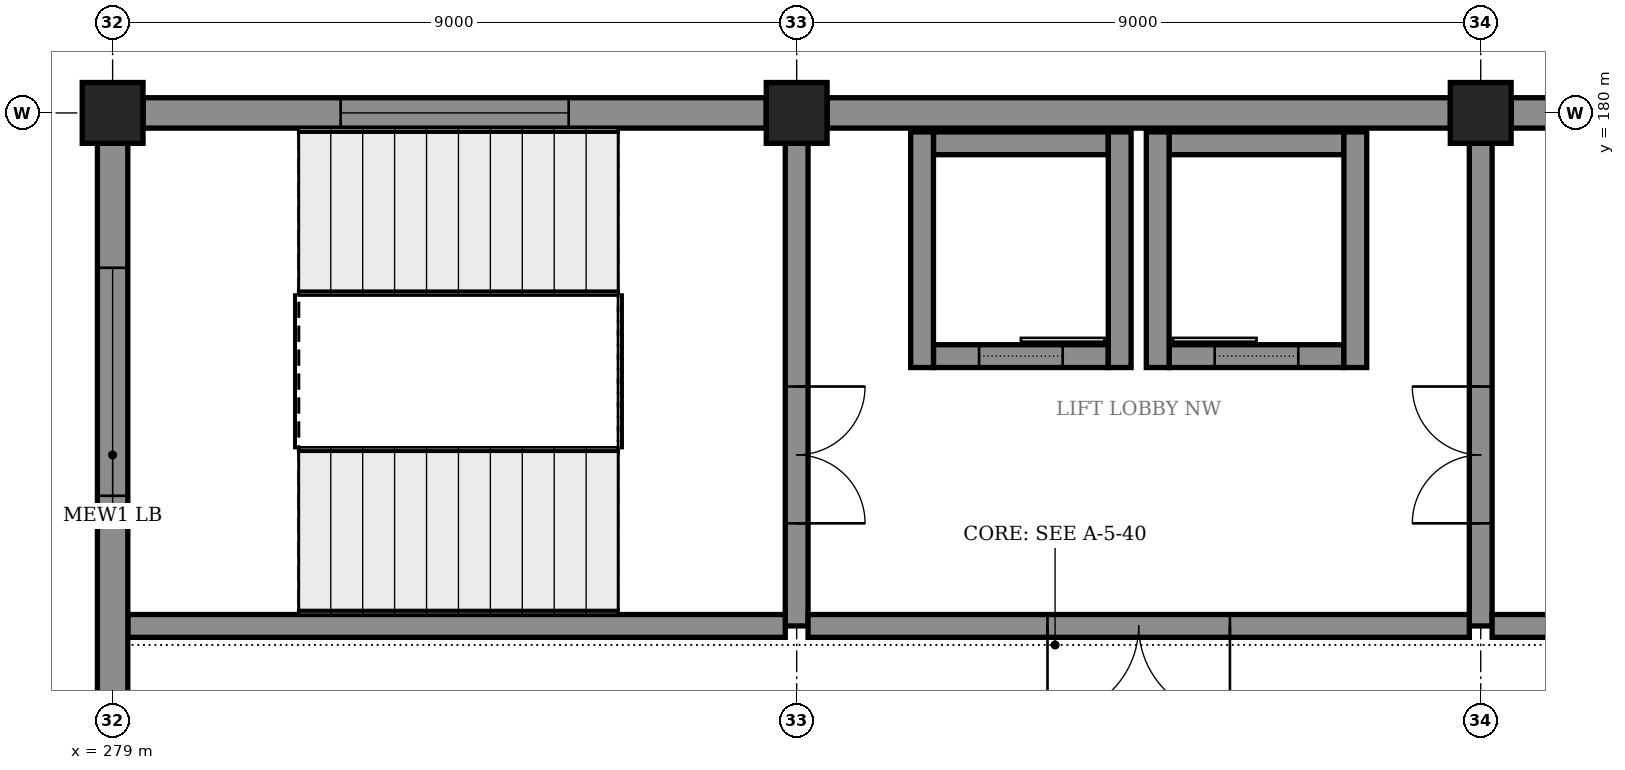
"""IFC4 building model, lengths in metres.
Left out: names, types, materials, properties, quantities, classifications, styles, units other than length and angle.
Written with IfcOpenShell. Run it as: python <this file> out.ifc"""

import sys

from ifc_helpers import new_model, si_unit, direction, frame, frame_2d, origin, origin_2d, place, context, subcontext, project, spatial, rectangle, extrude, element, fill, save


model = new_model("IFC4")
c1 = context("Model", 3, precision=1e-05, world=origin(), true_north=direction((0.0, 1.0)))
c2 = subcontext(c1, "Body", "Model", "MODEL_VIEW")
j1 = project(units=[si_unit("LENGTHUNIT", "METRE"), si_unit("PLANEANGLEUNIT", "RADIAN")], contexts=[c1])
p1 = place(None, origin())
s1 = spatial("IfcSite", under=j1, at=p1, CompositionType="ELEMENT")
p2 = place(p1, origin())
s2 = spatial("IfcBuilding", under=s1, at=p2, CompositionType="ELEMENT")
p3 = place(p2, frame((0.0, 0.0, 6.0)))
s3 = spatial("IfcBuildingStorey", under=s2, at=p3, CompositionType="ELEMENT", Elevation=6.0)
for number, where, z_axis, x_axis in (
    (1, (279.0, 180.0, 0.0), (0.0, 0.0, 1.0), (1.0, 0.0, 0.0)),
    (2, (288.0, 180.0, 0.0), (0.0, 0.0, 1.0), (1.0, 0.0, 0.0)),
    (3, (297.0, 180.0, 0.0), (0.0, 0.0, 1.0), (1.0, 0.0, 0.0)),
):
    element("IfcColumn", number, at=place(p3, frame(where, z_axis=z_axis, x_axis=x_axis)), inside=s3, PredefinedType="COLUMN", context=c2, shape_type="SweptSolid", body=[
        extrude(rectangle(XDim=0.8, YDim=0.8, at=origin_2d()), origin(), (0.0, 0.0, 1.0), 5.5),
    ])
p4 = place(p3, frame((279.4, 180.0, 0.0), z_axis=(0.0, 0.0, 1.0), x_axis=(1.0, 0.0, 0.0)))
e4 = element("IfcWall", 4, at=p4, inside=s3, PredefinedType="STANDARD", context=c2, shape_type="SweptSolid", body=[
    extrude(rectangle(XDim=8.2, YDim=0.4, at=frame_2d((4.1, 0.0))), origin(), (0.0, 0.0, 1.0), 4.32),
])
p5 = place(p4, frame((2.6, 0.0, 0.9)))
e5 = element("IfcOpeningElement", 5, at=p5, cuts=e4, PredefinedType="OPENING", context=c2, shape_type="SweptSolid", body=[
    extrude(rectangle(XDim=3.0, YDim=2.1, at=frame_2d((1.5, 1.05))), frame((0.0, 0.21, 0.0), z_axis=(0.0, -1.0, 0.0), x_axis=(1.0, 0.0, 0.0)), (0.0, 0.0, 1.0), 0.42),
])
p6 = place(p3, frame((288.4, 180.0, 0.0), z_axis=(0.0, 0.0, 1.0), x_axis=(1.0, 0.0, 0.0)))
e6 = element("IfcWall", 6, at=p6, inside=s3, PredefinedType="STANDARD", context=c2, shape_type="SweptSolid", body=[
    extrude(rectangle(XDim=8.2, YDim=0.4, at=frame_2d((4.1, 0.0))), origin(), (0.0, 0.0, 1.0), 4.32),
])
p7 = place(p3, frame((297.4, 180.0, 0.0), z_axis=(0.0, 0.0, 1.0), x_axis=(1.0, 0.0, 0.0)))
e7 = element("IfcWall", 7, at=p7, inside=s3, PredefinedType="STANDARD", context=c2, shape_type="SweptSolid", body=[
    extrude(rectangle(XDim=8.2, YDim=0.4, at=frame_2d((4.1, 0.0))), origin(), (0.0, 0.0, 1.0), 4.32),
])
p8 = place(p7, frame((2.6, 0.0, 0.9)))
e8 = element("IfcOpeningElement", 8, at=p8, cuts=e7, PredefinedType="OPENING", context=c2, shape_type="SweptSolid", body=[
    extrude(rectangle(XDim=3.0, YDim=2.1, at=frame_2d((1.5, 1.05))), frame((0.0, 0.21, 0.0), z_axis=(0.0, -1.0, 0.0), x_axis=(1.0, 0.0, 0.0)), (0.0, 0.0, 1.0), 0.42),
])
p9 = place(p3, frame((279.0, 171.4, 0.0), z_axis=(0.0, 0.0, 1.0), x_axis=(0.0, 1.0, 0.0)))
e9 = element("IfcWall", 9, at=p9, inside=s3, PredefinedType="STANDARD", context=c2, shape_type="SweptSolid", body=[
    extrude(rectangle(XDim=8.2, YDim=0.4, at=frame_2d((4.1, 0.0))), origin(), (0.0, 0.0, 1.0), 4.32),
])
p10 = place(p9, frame((3.562, 0.0, 0.9)))
e10 = element("IfcOpeningElement", 10, at=p10, cuts=e9, PredefinedType="OPENING", context=c2, shape_type="SweptSolid", body=[
    extrude(rectangle(XDim=3.0, YDim=2.1, at=frame_2d((1.5, 1.05))), frame((0.0, 0.21, 0.0), z_axis=(0.0, -1.0, 0.0), x_axis=(1.0, 0.0, 0.0)), (0.0, 0.0, 1.0), 0.42),
])
p11 = place(p3, frame((288.0, 173.25, 0.0), z_axis=(0.0, 0.0, 1.0), x_axis=(0.0, 1.0, 0.0)))
e11 = element("IfcWall", 11, at=p11, inside=s3, PredefinedType="SHEAR", context=c2, shape_type="SweptSolid", body=[
    extrude(rectangle(XDim=6.35, YDim=0.3, at=frame_2d((3.175, 0.0))), origin(), (0.0, 0.0, 1.0), 5.22),
])
p12 = place(p11, frame((1.35, 0.0, 0.0)))
e12 = element("IfcOpeningElement", 12, at=p12, cuts=e11, PredefinedType="OPENING", context=c2, shape_type="SweptSolid", body=[
    extrude(rectangle(XDim=1.8, YDim=2.4, at=frame_2d((0.9, 1.2))), frame((0.0, 0.16, 0.0), z_axis=(0.0, -1.0, 0.0), x_axis=(1.0, 0.0, 0.0)), (0.0, 0.0, 1.0), 0.32),
])
p13 = place(p3, frame((297.0, 173.25, 0.0), z_axis=(0.0, 0.0, 1.0), x_axis=(0.0, 1.0, 0.0)))
e13 = element("IfcWall", 13, at=p13, inside=s3, PredefinedType="SHEAR", context=c2, shape_type="SweptSolid", body=[
    extrude(rectangle(XDim=6.35, YDim=0.3, at=frame_2d((3.175, 0.0))), origin(), (0.0, 0.0, 1.0), 5.22),
])
p14 = place(p13, frame((1.35, 0.0, 0.0)))
e14 = element("IfcOpeningElement", 14, at=p14, cuts=e13, PredefinedType="OPENING", context=c2, shape_type="SweptSolid", body=[
    extrude(rectangle(XDim=1.8, YDim=2.4, at=frame_2d((0.9, 1.2))), frame((0.0, 0.16, 0.0), z_axis=(0.0, -1.0, 0.0), x_axis=(1.0, 0.0, 0.0)), (0.0, 0.0, 1.0), 0.32),
])
p15 = place(p3, frame((279.2, 173.25, 0.0), z_axis=(0.0, 0.0, 1.0), x_axis=(1.0, 0.0, 0.0)))
e15 = element("IfcWall", 15, at=p15, inside=s3, PredefinedType="SHEAR", context=c2, shape_type="SweptSolid", body=[
    extrude(rectangle(XDim=8.65, YDim=0.3, at=frame_2d((4.325, 0.0))), origin(), (0.0, 0.0, 1.0), 5.22),
])
p16 = place(p3, frame((288.15, 173.25, 0.0), z_axis=(0.0, 0.0, 1.0), x_axis=(1.0, 0.0, 0.0)))
e16 = element("IfcWall", 16, at=p16, inside=s3, PredefinedType="SHEAR", context=c2, shape_type="SweptSolid", body=[
    extrude(rectangle(XDim=8.7, YDim=0.3, at=frame_2d((4.35, 0.0))), origin(), (0.0, 0.0, 1.0), 5.22),
])
p17 = place(p16, frame((3.15, 0.0, 0.0)))
e17 = element("IfcOpeningElement", 17, at=p17, cuts=e16, PredefinedType="OPENING", context=c2, shape_type="SweptSolid", body=[
    extrude(rectangle(XDim=2.4, YDim=2.4, at=frame_2d((1.2, 1.2))), frame((0.0, 0.16, 0.0), z_axis=(0.0, -1.0, 0.0), x_axis=(1.0, 0.0, 0.0)), (0.0, 0.0, 1.0), 0.32),
])
p18 = place(p3, frame((297.15, 173.25, 0.0), z_axis=(0.0, 0.0, 1.0), x_axis=(1.0, 0.0, 0.0)))
e18 = element("IfcWall", 18, at=p18, inside=s3, PredefinedType="SHEAR", context=c2, shape_type="SweptSolid", body=[
    extrude(rectangle(XDim=8.7, YDim=0.3, at=frame_2d((4.35, 0.0))), origin(), (0.0, 0.0, 1.0), 5.22),
])
for number, where, z_axis, x_axis in (
    (19, (289.65, 176.65, 0.0), (0.0, 0.0, 1.0), (0.0, 1.0, 0.0)),
    (20, (292.25, 176.65, 0.0), (0.0, 0.0, 1.0), (0.0, 1.0, 0.0)),
):
    element("IfcWall", number, at=place(p3, frame(where, z_axis=z_axis, x_axis=x_axis)), inside=s3, PredefinedType="SHEAR", context=c2, shape_type="SweptSolid", body=[
        extrude(rectangle(XDim=3.1, YDim=0.3, at=frame_2d((1.55, 0.0))), origin(), (0.0, 0.0, 1.0), 5.5),
    ])
p19 = place(p3, frame((289.8, 179.6, 0.0), z_axis=(0.0, 0.0, 1.0), x_axis=(1.0, 0.0, 0.0)))
e21 = element("IfcWall", 21, at=p19, inside=s3, PredefinedType="SHEAR", context=c2, shape_type="SweptSolid", body=[
    extrude(rectangle(XDim=2.3, YDim=0.3, at=frame_2d((1.15, 0.0))), origin(), (0.0, 0.0, 1.0), 5.5),
])
p20 = place(p3, frame((289.8, 176.8, 0.0), z_axis=(0.0, 0.0, 1.0), x_axis=(1.0, 0.0, 0.0)))
e22 = element("IfcWall", 22, at=p20, inside=s3, PredefinedType="SHEAR", context=c2, shape_type="SweptSolid", body=[
    extrude(rectangle(XDim=2.3, YDim=0.3, at=frame_2d((1.15, 0.0))), origin(), (0.0, 0.0, 1.0), 5.5),
])
p21 = place(p20, frame((0.6, 0.0, 0.0)))
e23 = element("IfcOpeningElement", 23, at=p21, cuts=e22, PredefinedType="OPENING", context=c2, shape_type="SweptSolid", body=[
    extrude(rectangle(XDim=1.1, YDim=2.2, at=frame_2d((0.55, 1.1))), frame((0.0, 0.16, 0.0), z_axis=(0.0, -1.0, 0.0), x_axis=(1.0, 0.0, 0.0)), (0.0, 0.0, 1.0), 0.32),
])
for number, where, z_axis, x_axis in (
    (24, (292.75, 176.65, 0.0), (0.0, 0.0, 1.0), (0.0, 1.0, 0.0)),
    (25, (295.35, 176.65, 0.0), (0.0, 0.0, 1.0), (0.0, 1.0, 0.0)),
):
    element("IfcWall", number, at=place(p3, frame(where, z_axis=z_axis, x_axis=x_axis)), inside=s3, PredefinedType="SHEAR", context=c2, shape_type="SweptSolid", body=[
        extrude(rectangle(XDim=3.1, YDim=0.3, at=frame_2d((1.55, 0.0))), origin(), (0.0, 0.0, 1.0), 5.5),
    ])
p22 = place(p3, frame((292.9, 179.6, 0.0), z_axis=(0.0, 0.0, 1.0), x_axis=(1.0, 0.0, 0.0)))
e26 = element("IfcWall", 26, at=p22, inside=s3, PredefinedType="SHEAR", context=c2, shape_type="SweptSolid", body=[
    extrude(rectangle(XDim=2.3, YDim=0.3, at=frame_2d((1.15, 0.0))), origin(), (0.0, 0.0, 1.0), 5.5),
])
p23 = place(p3, frame((292.9, 176.8, 0.0), z_axis=(0.0, 0.0, 1.0), x_axis=(1.0, 0.0, 0.0)))
e27 = element("IfcWall", 27, at=p23, inside=s3, PredefinedType="SHEAR", context=c2, shape_type="SweptSolid", body=[
    extrude(rectangle(XDim=2.3, YDim=0.3, at=frame_2d((1.15, 0.0))), origin(), (0.0, 0.0, 1.0), 5.5),
])
p24 = place(p23, frame((0.6, 0.0, 0.0)))
e28 = element("IfcOpeningElement", 28, at=p24, cuts=e27, PredefinedType="OPENING", context=c2, shape_type="SweptSolid", body=[
    extrude(rectangle(XDim=1.1, YDim=2.2, at=frame_2d((0.55, 1.1))), frame((0.0, 0.16, 0.0), z_axis=(0.0, -1.0, 0.0), x_axis=(1.0, 0.0, 0.0)), (0.0, 0.0, 1.0), 0.32),
])
p25 = place(p5, origin())
e29 = element("IfcWindow", 29, at=p25, inside=s3, PartitioningType="TRIPLE_PANEL_VERTICAL", PredefinedType="WINDOW", context=c2, shape_type="SweptSolid", body=[
    extrude(rectangle(XDim=3.0, YDim=2.1, at=frame_2d((1.5, 1.05))), frame((0.0, 0.03, 0.0), z_axis=(0.0, -1.0, 0.0), x_axis=(1.0, 0.0, 0.0)), (0.0, 0.0, 1.0), 0.06),
])
fill(e5, e29)
p26 = place(p10, origin())
e30 = element("IfcWindow", 30, at=p26, inside=s3, PartitioningType="TRIPLE_PANEL_VERTICAL", PredefinedType="WINDOW", context=c2, shape_type="SweptSolid", body=[
    extrude(rectangle(XDim=3.0, YDim=2.1, at=frame_2d((1.5, 1.05))), frame((0.0, 0.03, 0.0), z_axis=(0.0, -1.0, 0.0), x_axis=(1.0, 0.0, 0.0)), (0.0, 0.0, 1.0), 0.06),
])
fill(e10, e30)
p27 = place(p12, frame((1.8, 0.0, 0.0), z_axis=(0.0, 0.0, 1.0), x_axis=(-1.0, 0.0, 0.0)))
e31 = element("IfcDoor", 31, at=p27, inside=s3, OperationType="DOUBLE_DOOR_SINGLE_SWING", PredefinedType="DOOR", context=c2, shape_type="SweptSolid", body=[
    extrude(rectangle(XDim=1.8, YDim=2.4, at=frame_2d((0.9, 1.2))), frame((0.0, 0.025, 0.0), z_axis=(0.0, -1.0, 0.0), x_axis=(1.0, 0.0, 0.0)), (0.0, 0.0, 1.0), 0.05),
])
fill(e12, e31)
p28 = place(p14, origin())
e32 = element("IfcDoor", 32, at=p28, inside=s3, OperationType="DOUBLE_DOOR_SINGLE_SWING", PredefinedType="DOOR", context=c2, shape_type="SweptSolid", body=[
    extrude(rectangle(XDim=1.8, YDim=2.4, at=frame_2d((0.9, 1.2))), frame((0.0, 0.025, 0.0), z_axis=(0.0, -1.0, 0.0), x_axis=(1.0, 0.0, 0.0)), (0.0, 0.0, 1.0), 0.05),
])
fill(e14, e32)
p29 = place(p17, frame((2.4, 0.0, 0.0), z_axis=(0.0, 0.0, 1.0), x_axis=(-1.0, 0.0, 0.0)))
e33 = element("IfcDoor", 33, at=p29, inside=s3, OperationType="DOUBLE_DOOR_SINGLE_SWING", PredefinedType="DOOR", context=c2, shape_type="SweptSolid", body=[
    extrude(rectangle(XDim=2.4, YDim=2.4, at=frame_2d((1.2, 1.2))), frame((0.0, 0.025, 0.0), z_axis=(0.0, -1.0, 0.0), x_axis=(1.0, 0.0, 0.0)), (0.0, 0.0, 1.0), 0.05),
])
fill(e17, e33)
p30 = place(p21, origin())
e34 = element("IfcDoor", 34, at=p30, inside=s3, OperationType="SLIDING_TO_RIGHT", PredefinedType="DOOR", context=c2, shape_type="SweptSolid", body=[
    extrude(rectangle(XDim=1.1, YDim=2.2, at=frame_2d((0.55, 1.1))), frame((0.0, 0.025, 0.0), z_axis=(0.0, -1.0, 0.0), x_axis=(1.0, 0.0, 0.0)), (0.0, 0.0, 1.0), 0.05),
])
fill(e23, e34)
p31 = place(p24, origin())
e35 = element("IfcDoor", 35, at=p31, inside=s3, OperationType="SLIDING_TO_LEFT", PredefinedType="DOOR", context=c2, shape_type="SweptSolid", body=[
    extrude(rectangle(XDim=1.1, YDim=2.2, at=frame_2d((0.55, 1.1))), frame((0.0, 0.025, 0.0), z_axis=(0.0, -1.0, 0.0), x_axis=(1.0, 0.0, 0.0)), (0.0, 0.0, 1.0), 0.05),
])
fill(e28, e35)
save(model, sys.argv[1])
